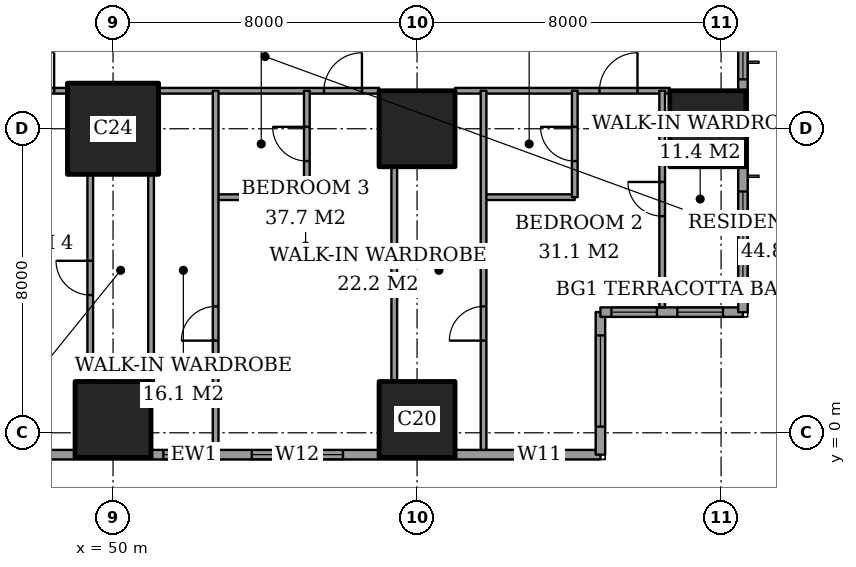
"""IFC4 building model, lengths in metres.
Left out: names, types, materials, properties, quantities, classifications, styles, units other than length and angle.
Written with IfcOpenShell. Run it as: python <this file> out.ifc"""

import sys

from ifc_helpers import new_model, si_unit, direction, frame, frame_2d, origin, origin_2d, place, context, subcontext, project, spatial, rectangle, extrude, element, fill, save


model = new_model("IFC4")
c1 = context("Model", 3, precision=1e-05, world=origin(), true_north=direction((0.0, 1.0)))
c2 = subcontext(c1, "Body", "Model", "MODEL_VIEW")
j1 = project(units=[si_unit("LENGTHUNIT", "METRE"), si_unit("PLANEANGLEUNIT", "RADIAN")], contexts=[c1])
p1 = place(None, origin())
s1 = spatial("IfcSite", under=j1, at=p1, CompositionType="ELEMENT")
p2 = place(p1, origin())
s2 = spatial("IfcBuilding", under=s1, at=p2, CompositionType="ELEMENT")
p3 = place(p2, frame((0.0, 0.0, 125.0)))
s3 = spatial("IfcBuildingStorey", under=s2, at=p3, CompositionType="ELEMENT", Elevation=125.0)
p4 = place(p3, frame((50.0, 0.35, 0.0), z_axis=(0.0, 0.0, 1.0), x_axis=(1.0, 0.0, 0.0)))
e1 = element("IfcColumn", 1, at=p4, inside=s3, PredefinedType="COLUMN", context=c2, shape_type="SweptSolid", body=[
    extrude(rectangle(XDim=2.0, YDim=2.0, at=origin_2d()), origin(), (0.0, 0.0, 1.0), 3.6),
])
p5 = place(p3, frame((50.0, 8.0, 0.0), z_axis=(0.0, 0.0, 1.0), x_axis=(1.0, 0.0, 0.0)))
e2 = element("IfcColumn", 2, at=p5, inside=s3, PredefinedType="COLUMN", context=c2, shape_type="SweptSolid", body=[
    extrude(rectangle(XDim=2.4, YDim=2.4, at=origin_2d()), origin(), (0.0, 0.0, 1.0), 3.6),
])
for number, where, z_axis, x_axis in (
    (3, (58.0, 0.35, 0.0), (0.0, 0.0, 1.0), (1.0, 0.0, 0.0)),
    (4, (58.0, 8.0, 0.0), (0.0, 0.0, 1.0), (1.0, 0.0, 0.0)),
    (5, (65.65, 8.0, 0.0), (0.0, 0.0, 1.0), (1.0, 0.0, 0.0)),
):
    element("IfcColumn", number, at=place(p3, frame(where, z_axis=z_axis, x_axis=x_axis)), inside=s3, PredefinedType="COLUMN", context=c2, shape_type="SweptSolid", body=[
        extrude(rectangle(XDim=2.0, YDim=2.0, at=origin_2d()), origin(), (0.0, 0.0, 1.0), 3.6),
    ])
p6 = place(p3, frame((41.425, -0.575, 0.0), z_axis=(0.0, 0.0, 1.0), x_axis=(1.0, 0.0, 0.0)))
e6 = element("IfcWall", 6, at=p6, inside=s3, PredefinedType="SOLIDWALL", context=c2, shape_type="SweptSolid", body=[
    extrude(rectangle(XDim=21.4, YDim=0.25, at=frame_2d((10.7, 0.0))), origin(), (0.0, 0.0, 1.0), 3.6),
])
p7 = place(p6, frame((2.3, 0.0, 0.4)))
e7 = element("IfcOpeningElement", 7, at=p7, cuts=e6, PredefinedType="OPENING", context=c2, shape_type="SweptSolid", body=[
    extrude(rectangle(XDim=1.2, YDim=2.2, at=frame_2d((0.6, 1.1))), frame((0.0, 0.135, 0.0), z_axis=(0.0, -1.0, 0.0), x_axis=(1.0, 0.0, 0.0)), (0.0, 0.0, 1.0), 0.27),
])
p8 = place(p6, frame((4.525, 0.0, 0.4)))
e8 = element("IfcOpeningElement", 8, at=p8, cuts=e6, PredefinedType="OPENING", context=c2, shape_type="SweptSolid", body=[
    extrude(rectangle(XDim=2.4, YDim=2.2, at=frame_2d((1.2, 1.1))), frame((0.0, 0.135, 0.0), z_axis=(0.0, -1.0, 0.0), x_axis=(1.0, 0.0, 0.0)), (0.0, 0.0, 1.0), 0.27),
])
p9 = place(p6, frame((9.9, 0.0, 0.4)))
e9 = element("IfcOpeningElement", 9, at=p9, cuts=e6, PredefinedType="OPENING", context=c2, shape_type="SweptSolid", body=[
    extrude(rectangle(XDim=1.2, YDim=2.2, at=frame_2d((0.6, 1.1))), frame((0.0, 0.135, 0.0), z_axis=(0.0, -1.0, 0.0), x_axis=(1.0, 0.0, 0.0)), (0.0, 0.0, 1.0), 0.27),
])
p10 = place(p6, frame((12.225, 0.0, 0.4)))
e10 = element("IfcOpeningElement", 10, at=p10, cuts=e6, PredefinedType="OPENING", context=c2, shape_type="SweptSolid", body=[
    extrude(rectangle(XDim=2.4, YDim=2.2, at=frame_2d((1.2, 1.1))), frame((0.0, 0.135, 0.0), z_axis=(0.0, -1.0, 0.0), x_axis=(1.0, 0.0, 0.0)), (0.0, 0.0, 1.0), 0.27),
])
p11 = place(p6, frame((19.2, 0.0, 0.4)))
e11 = element("IfcOpeningElement", 11, at=p11, cuts=e6, PredefinedType="OPENING", context=c2, shape_type="SweptSolid", body=[
    extrude(rectangle(XDim=1.2, YDim=2.2, at=frame_2d((0.6, 1.1))), frame((0.0, 0.135, 0.0), z_axis=(0.0, -1.0, 0.0), x_axis=(1.0, 0.0, 0.0)), (0.0, 0.0, 1.0), 0.27),
])
p12 = place(p3, frame((62.825, -0.575, 0.0), z_axis=(0.0, 0.0, 1.0), x_axis=(0.0, 1.0, 0.0)))
e12 = element("IfcWall", 12, at=p12, inside=s3, PredefinedType="SOLIDWALL", context=c2, shape_type="SweptSolid", body=[
    extrude(rectangle(XDim=3.75, YDim=0.25, at=frame_2d((1.875, 0.0))), origin(), (0.0, 0.0, 1.0), 3.6),
])
p13 = place(p12, frame((0.738, 0.0, 0.4)))
e13 = element("IfcOpeningElement", 13, at=p13, cuts=e12, PredefinedType="OPENING", context=c2, shape_type="SweptSolid", body=[
    extrude(rectangle(XDim=2.4, YDim=2.2, at=frame_2d((1.2, 1.1))), frame((0.0, 0.135, 0.0), z_axis=(0.0, -1.0, 0.0), x_axis=(1.0, 0.0, 0.0)), (0.0, 0.0, 1.0), 0.27),
])
p14 = place(p3, frame((62.825, 3.175, 0.0), z_axis=(0.0, 0.0, 1.0), x_axis=(1.0, 0.0, 0.0)))
e14 = element("IfcWall", 14, at=p14, inside=s3, PredefinedType="SOLIDWALL", context=c2, shape_type="SweptSolid", body=[
    extrude(rectangle(XDim=3.75, YDim=0.25, at=frame_2d((1.875, 0.0))), origin(), (0.0, 0.0, 1.0), 3.6),
])
p15 = place(p14, frame((0.288, 0.0, 0.4)))
e15 = element("IfcOpeningElement", 15, at=p15, cuts=e14, PredefinedType="OPENING", context=c2, shape_type="SweptSolid", body=[
    extrude(rectangle(XDim=1.2, YDim=2.2, at=frame_2d((0.6, 1.1))), frame((0.0, 0.135, 0.0), z_axis=(0.0, -1.0, 0.0), x_axis=(1.0, 0.0, 0.0)), (0.0, 0.0, 1.0), 0.27),
])
p16 = place(p14, frame((2.025, 0.0, 0.4)))
e16 = element("IfcOpeningElement", 16, at=p16, cuts=e14, PredefinedType="OPENING", context=c2, shape_type="SweptSolid", body=[
    extrude(rectangle(XDim=1.2, YDim=2.2, at=frame_2d((0.6, 1.1))), frame((0.0, 0.135, 0.0), z_axis=(0.0, -1.0, 0.0), x_axis=(1.0, 0.0, 0.0)), (0.0, 0.0, 1.0), 0.27),
])
p17 = place(p3, frame((66.575, 3.175, 0.0), z_axis=(0.0, 0.0, 1.0), x_axis=(0.0, 1.0, 0.0)))
e17 = element("IfcWall", 17, at=p17, inside=s3, PredefinedType="SOLIDWALL", context=c2, shape_type="SweptSolid", body=[
    extrude(rectangle(XDim=41.65, YDim=0.25, at=frame_2d((20.825, 0.0))), origin(), (0.0, 0.0, 1.0), 3.6),
])
p18 = place(p17, frame((0.775, 0.0, 0.4)))
e18 = element("IfcOpeningElement", 18, at=p18, cuts=e17, PredefinedType="OPENING", context=c2, shape_type="SweptSolid", body=[
    extrude(rectangle(XDim=2.4, YDim=2.2, at=frame_2d((1.2, 1.1))), frame((0.0, 0.135, 0.0), z_axis=(0.0, -1.0, 0.0), x_axis=(1.0, 0.0, 0.0)), (0.0, 0.0, 1.0), 0.27),
])
p19 = place(p17, frame((6.125, 0.0, 0.4)))
e19 = element("IfcOpeningElement", 19, at=p19, cuts=e17, PredefinedType="OPENING", context=c2, shape_type="SweptSolid", body=[
    extrude(rectangle(XDim=1.2, YDim=2.2, at=frame_2d((0.6, 1.1))), frame((0.0, 0.135, 0.0), z_axis=(0.0, -1.0, 0.0), x_axis=(1.0, 0.0, 0.0)), (0.0, 0.0, 1.0), 0.27),
])
p20 = place(p17, frame((8.375, 0.0, 0.4)))
e20 = element("IfcOpeningElement", 20, at=p20, cuts=e17, PredefinedType="OPENING", context=c2, shape_type="SweptSolid", body=[
    extrude(rectangle(XDim=2.4, YDim=2.2, at=frame_2d((1.2, 1.1))), frame((0.0, 0.135, 0.0), z_axis=(0.0, -1.0, 0.0), x_axis=(1.0, 0.0, 0.0)), (0.0, 0.0, 1.0), 0.27),
])
p21 = place(p17, frame((15.775, 0.0, 0.4)))
e21 = element("IfcOpeningElement", 21, at=p21, cuts=e17, PredefinedType="OPENING", context=c2, shape_type="SweptSolid", body=[
    extrude(rectangle(XDim=2.4, YDim=2.2, at=frame_2d((1.2, 1.1))), frame((0.0, 0.135, 0.0), z_axis=(0.0, -1.0, 0.0), x_axis=(1.0, 0.0, 0.0)), (0.0, 0.0, 1.0), 0.27),
])
p22 = place(p17, frame((23.475, 0.0, 0.4)))
e22 = element("IfcOpeningElement", 22, at=p22, cuts=e17, PredefinedType="OPENING", context=c2, shape_type="SweptSolid", body=[
    extrude(rectangle(XDim=2.4, YDim=2.2, at=frame_2d((1.2, 1.1))), frame((0.0, 0.135, 0.0), z_axis=(0.0, -1.0, 0.0), x_axis=(1.0, 0.0, 0.0)), (0.0, 0.0, 1.0), 0.27),
])
p23 = place(p17, frame((30.975, 0.0, 0.4)))
e23 = element("IfcOpeningElement", 23, at=p23, cuts=e17, PredefinedType="OPENING", context=c2, shape_type="SweptSolid", body=[
    extrude(rectangle(XDim=2.4, YDim=2.2, at=frame_2d((1.2, 1.1))), frame((0.0, 0.135, 0.0), z_axis=(0.0, -1.0, 0.0), x_axis=(1.0, 0.0, 0.0)), (0.0, 0.0, 1.0), 0.27),
])
p24 = place(p17, frame((34.5, 0.0, 0.4)))
e24 = element("IfcOpeningElement", 24, at=p24, cuts=e17, PredefinedType="OPENING", context=c2, shape_type="SweptSolid", body=[
    extrude(rectangle(XDim=1.2, YDim=2.2, at=frame_2d((0.6, 1.1))), frame((0.0, 0.135, 0.0), z_axis=(0.0, -1.0, 0.0), x_axis=(1.0, 0.0, 0.0)), (0.0, 0.0, 1.0), 0.27),
])
p25 = place(p17, frame((38.475, 0.0, 0.4)))
e25 = element("IfcOpeningElement", 25, at=p25, cuts=e17, PredefinedType="OPENING", context=c2, shape_type="SweptSolid", body=[
    extrude(rectangle(XDim=2.4, YDim=2.2, at=frame_2d((1.2, 1.1))), frame((0.0, 0.135, 0.0), z_axis=(0.0, -1.0, 0.0), x_axis=(1.0, 0.0, 0.0)), (0.0, 0.0, 1.0), 0.27),
])
p26 = place(p3, frame((52.7, 6.2, 0.0), z_axis=(0.0, 0.0, 1.0), x_axis=(1.0, 0.0, 0.0)))
e26 = element("IfcWall", 26, at=p26, inside=s3, PredefinedType="PARTITIONING", context=c2, shape_type="SweptSolid", body=[
    extrude(rectangle(XDim=2.4, YDim=0.15, at=frame_2d((1.2, 0.0))), origin(), (0.0, 0.0, 1.0), 3.35),
])
p27 = place(p3, frame((59.75, 6.2, 0.0), z_axis=(0.0, 0.0, 1.0), x_axis=(1.0, 0.0, 0.0)))
e27 = element("IfcWall", 27, at=p27, inside=s3, PredefinedType="PARTITIONING", context=c2, shape_type="SweptSolid", body=[
    extrude(rectangle(XDim=2.4, YDim=0.15, at=frame_2d((1.2, 0.0))), origin(), (0.0, 0.0, 1.0), 3.35),
])
p28 = place(p3, frame((43.35, 9.0, 0.0), z_axis=(0.0, 0.0, 1.0), x_axis=(1.0, 0.0, 0.0)))
e28 = element("IfcWall", 28, at=p28, inside=s3, PredefinedType="PARTITIONING", context=c2, shape_type="SweptSolid", body=[
    extrude(rectangle(XDim=5.45, YDim=0.15, at=frame_2d((2.725, 0.0))), origin(), (0.0, 0.0, 1.0), 3.35),
])
p29 = place(p28, frame((4.1, 0.0, 0.0)))
e29 = element("IfcOpeningElement", 29, at=p29, cuts=e28, PredefinedType="OPENING", context=c2, shape_type="SweptSolid", body=[
    extrude(rectangle(XDim=1.0, YDim=2.1, at=frame_2d((0.5, 1.05))), frame((0.0, 0.085, 0.0), z_axis=(0.0, -1.0, 0.0), x_axis=(1.0, 0.0, 0.0)), (0.0, 0.0, 1.0), 0.17),
])
p30 = place(p28, frame((0.475, 0.0, 0.0)))
e30 = element("IfcOpeningElement", 30, at=p30, cuts=e28, PredefinedType="OPENING", context=c2, shape_type="SweptSolid", body=[
    extrude(rectangle(XDim=1.0, YDim=2.1, at=frame_2d((0.5, 1.05))), frame((0.0, 0.085, 0.0), z_axis=(0.0, -1.0, 0.0), x_axis=(1.0, 0.0, 0.0)), (0.0, 0.0, 1.0), 0.17),
])
p31 = place(p3, frame((51.2, 9.0, 0.0), z_axis=(0.0, 0.0, 1.0), x_axis=(1.0, 0.0, 0.0)))
e31 = element("IfcWall", 31, at=p31, inside=s3, PredefinedType="PARTITIONING", context=c2, shape_type="SweptSolid", body=[
    extrude(rectangle(XDim=5.8, YDim=0.15, at=frame_2d((2.9, 0.0))), origin(), (0.0, 0.0, 1.0), 3.35),
])
p32 = place(p31, frame((4.35, 0.0, 0.0)))
e32 = element("IfcOpeningElement", 32, at=p32, cuts=e31, PredefinedType="OPENING", context=c2, shape_type="SweptSolid", body=[
    extrude(rectangle(XDim=1.0, YDim=2.1, at=frame_2d((0.5, 1.05))), frame((0.0, 0.085, 0.0), z_axis=(0.0, -1.0, 0.0), x_axis=(1.0, 0.0, 0.0)), (0.0, 0.0, 1.0), 0.17),
])
p33 = place(p3, frame((59.0, 9.0, 0.0), z_axis=(0.0, 0.0, 1.0), x_axis=(1.0, 0.0, 0.0)))
e33 = element("IfcWall", 33, at=p33, inside=s3, PredefinedType="PARTITIONING", context=c2, shape_type="SweptSolid", body=[
    extrude(rectangle(XDim=5.65, YDim=0.15, at=frame_2d((2.825, 0.0))), origin(), (0.0, 0.0, 1.0), 3.35),
])
p34 = place(p33, frame((3.8, 0.0, 0.0)))
e34 = element("IfcOpeningElement", 34, at=p34, cuts=e33, PredefinedType="OPENING", context=c2, shape_type="SweptSolid", body=[
    extrude(rectangle(XDim=1.0, YDim=2.1, at=frame_2d((0.5, 1.05))), frame((0.0, 0.085, 0.0), z_axis=(0.0, -1.0, 0.0), x_axis=(1.0, 0.0, 0.0)), (0.0, 0.0, 1.0), 0.17),
])
p35 = place(p3, frame((49.4, 1.35, 0.0), z_axis=(0.0, 0.0, 1.0), x_axis=(0.0, 1.0, 0.0)))
e35 = element("IfcWall", 35, at=p35, inside=s3, PredefinedType="PARTITIONING", context=c2, shape_type="SweptSolid", body=[
    extrude(rectangle(XDim=5.45, YDim=0.15, at=frame_2d((2.725, 0.0))), origin(), (0.0, 0.0, 1.0), 3.35),
])
p36 = place(p35, frame((2.275, 0.0, 0.0)))
e36 = element("IfcOpeningElement", 36, at=p36, cuts=e35, PredefinedType="OPENING", context=c2, shape_type="SweptSolid", body=[
    extrude(rectangle(XDim=0.9, YDim=2.1, at=frame_2d((0.45, 1.05))), frame((0.0, 0.085, 0.0), z_axis=(0.0, -1.0, 0.0), x_axis=(1.0, 0.0, 0.0)), (0.0, 0.0, 1.0), 0.17),
])
p37 = place(p3, frame((51.0, 1.35, 0.0), z_axis=(0.0, 0.0, 1.0), x_axis=(0.0, 1.0, 0.0)))
e37 = element("IfcWall", 37, at=p37, inside=s3, PredefinedType="PARTITIONING", context=c2, shape_type="SweptSolid", body=[
    extrude(rectangle(XDim=5.45, YDim=0.15, at=frame_2d((2.725, 0.0))), origin(), (0.0, 0.0, 1.0), 3.35),
])
p38 = place(p3, frame((52.7, -0.45, 0.0), z_axis=(0.0, 0.0, 1.0), x_axis=(0.0, 1.0, 0.0)))
e38 = element("IfcWall", 38, at=p38, inside=s3, PredefinedType="PARTITIONING", context=c2, shape_type="SweptSolid", body=[
    extrude(rectangle(XDim=9.45, YDim=0.15, at=frame_2d((4.725, 0.0))), origin(), (0.0, 0.0, 1.0), 3.35),
])
p39 = place(p38, frame((2.875, 0.0, 0.0)))
e39 = element("IfcOpeningElement", 39, at=p39, cuts=e38, PredefinedType="OPENING", context=c2, shape_type="SweptSolid", body=[
    extrude(rectangle(XDim=0.9, YDim=2.1, at=frame_2d((0.45, 1.05))), frame((0.0, 0.085, 0.0), z_axis=(0.0, -1.0, 0.0), x_axis=(1.0, 0.0, 0.0)), (0.0, 0.0, 1.0), 0.17),
])
p40 = place(p3, frame((55.1, 6.2, 0.0), z_axis=(0.0, 0.0, 1.0), x_axis=(0.0, 1.0, 0.0)))
e40 = element("IfcWall", 40, at=p40, inside=s3, PredefinedType="PARTITIONING", context=c2, shape_type="SweptSolid", body=[
    extrude(rectangle(XDim=2.8, YDim=0.15, at=frame_2d((1.4, 0.0))), origin(), (0.0, 0.0, 1.0), 3.35),
])
p41 = place(p40, frame((0.95, 0.0, 0.0)))
e41 = element("IfcOpeningElement", 41, at=p41, cuts=e40, PredefinedType="OPENING", context=c2, shape_type="SweptSolid", body=[
    extrude(rectangle(XDim=0.9, YDim=2.1, at=frame_2d((0.45, 1.05))), frame((0.0, 0.085, 0.0), z_axis=(0.0, -1.0, 0.0), x_axis=(1.0, 0.0, 0.0)), (0.0, 0.0, 1.0), 0.17),
])
p42 = place(p3, frame((57.4, 1.35, 0.0), z_axis=(0.0, 0.0, 1.0), x_axis=(0.0, 1.0, 0.0)))
e42 = element("IfcWall", 42, at=p42, inside=s3, PredefinedType="PARTITIONING", context=c2, shape_type="SweptSolid", body=[
    extrude(rectangle(XDim=5.65, YDim=0.15, at=frame_2d((2.825, 0.0))), origin(), (0.0, 0.0, 1.0), 3.35),
])
p43 = place(p3, frame((59.75, -0.45, 0.0), z_axis=(0.0, 0.0, 1.0), x_axis=(0.0, 1.0, 0.0)))
e43 = element("IfcWall", 43, at=p43, inside=s3, PredefinedType="PARTITIONING", context=c2, shape_type="SweptSolid", body=[
    extrude(rectangle(XDim=9.45, YDim=0.15, at=frame_2d((4.725, 0.0))), origin(), (0.0, 0.0, 1.0), 3.35),
])
p44 = place(p43, frame((2.875, 0.0, 0.0)))
e44 = element("IfcOpeningElement", 44, at=p44, cuts=e43, PredefinedType="OPENING", context=c2, shape_type="SweptSolid", body=[
    extrude(rectangle(XDim=0.9, YDim=2.1, at=frame_2d((0.45, 1.05))), frame((0.0, 0.085, 0.0), z_axis=(0.0, -1.0, 0.0), x_axis=(1.0, 0.0, 0.0)), (0.0, 0.0, 1.0), 0.17),
])
p45 = place(p3, frame((62.15, 6.2, 0.0), z_axis=(0.0, 0.0, 1.0), x_axis=(0.0, 1.0, 0.0)))
e45 = element("IfcWall", 45, at=p45, inside=s3, PredefinedType="PARTITIONING", context=c2, shape_type="SweptSolid", body=[
    extrude(rectangle(XDim=2.8, YDim=0.15, at=frame_2d((1.4, 0.0))), origin(), (0.0, 0.0, 1.0), 3.35),
])
p46 = place(p45, frame((0.95, 0.0, 0.0)))
e46 = element("IfcOpeningElement", 46, at=p46, cuts=e45, PredefinedType="OPENING", context=c2, shape_type="SweptSolid", body=[
    extrude(rectangle(XDim=0.9, YDim=2.1, at=frame_2d((0.45, 1.05))), frame((0.0, 0.085, 0.0), z_axis=(0.0, -1.0, 0.0), x_axis=(1.0, 0.0, 0.0)), (0.0, 0.0, 1.0), 0.17),
])
p47 = place(p3, frame((64.45, 3.3, 0.0), z_axis=(0.0, 0.0, 1.0), x_axis=(0.0, 1.0, 0.0)))
e47 = element("IfcWall", 47, at=p47, inside=s3, PredefinedType="PARTITIONING", context=c2, shape_type="SweptSolid", body=[
    extrude(rectangle(XDim=5.7, YDim=0.15, at=frame_2d((2.85, 0.0))), origin(), (0.0, 0.0, 1.0), 3.35),
])
p48 = place(p47, frame((2.4, 0.0, 0.0)))
e48 = element("IfcOpeningElement", 48, at=p48, cuts=e47, PredefinedType="OPENING", context=c2, shape_type="SweptSolid", body=[
    extrude(rectangle(XDim=0.9, YDim=2.1, at=frame_2d((0.45, 1.05))), frame((0.0, 0.085, 0.0), z_axis=(0.0, -1.0, 0.0), x_axis=(1.0, 0.0, 0.0)), (0.0, 0.0, 1.0), 0.17),
])
p49 = place(p9, origin())
e49 = element("IfcWindow", 49, at=p49, inside=s3, PartitioningType="SINGLE_PANEL", PredefinedType="WINDOW", context=c2, shape_type="SweptSolid", body=[
    extrude(rectangle(XDim=1.2, YDim=2.2, at=frame_2d((0.6, 1.1))), frame((0.0, 0.03, 0.0), z_axis=(0.0, -1.0, 0.0), x_axis=(1.0, 0.0, 0.0)), (0.0, 0.0, 1.0), 0.06),
])
fill(e9, e49)
p50 = place(p10, origin())
e50 = element("IfcWindow", 50, at=p50, inside=s3, PartitioningType="SINGLE_PANEL", PredefinedType="WINDOW", context=c2, shape_type="SweptSolid", body=[
    extrude(rectangle(XDim=2.4, YDim=2.2, at=frame_2d((1.2, 1.1))), frame((0.0, 0.03, 0.0), z_axis=(0.0, -1.0, 0.0), x_axis=(1.0, 0.0, 0.0)), (0.0, 0.0, 1.0), 0.06),
])
fill(e10, e50)
p51 = place(p11, origin())
e51 = element("IfcWindow", 51, at=p51, inside=s3, PartitioningType="SINGLE_PANEL", PredefinedType="WINDOW", context=c2, shape_type="SweptSolid", body=[
    extrude(rectangle(XDim=1.2, YDim=2.2, at=frame_2d((0.6, 1.1))), frame((0.0, 0.03, 0.0), z_axis=(0.0, -1.0, 0.0), x_axis=(1.0, 0.0, 0.0)), (0.0, 0.0, 1.0), 0.06),
])
fill(e11, e51)
p52 = place(p13, origin())
e52 = element("IfcWindow", 52, at=p52, inside=s3, PartitioningType="SINGLE_PANEL", PredefinedType="WINDOW", context=c2, shape_type="SweptSolid", body=[
    extrude(rectangle(XDim=2.4, YDim=2.2, at=frame_2d((1.2, 1.1))), frame((0.0, 0.03, 0.0), z_axis=(0.0, -1.0, 0.0), x_axis=(1.0, 0.0, 0.0)), (0.0, 0.0, 1.0), 0.06),
])
fill(e13, e52)
p53 = place(p15, origin())
e53 = element("IfcWindow", 53, at=p53, inside=s3, PartitioningType="SINGLE_PANEL", PredefinedType="WINDOW", context=c2, shape_type="SweptSolid", body=[
    extrude(rectangle(XDim=1.2, YDim=2.2, at=frame_2d((0.6, 1.1))), frame((0.0, 0.03, 0.0), z_axis=(0.0, -1.0, 0.0), x_axis=(1.0, 0.0, 0.0)), (0.0, 0.0, 1.0), 0.06),
])
fill(e15, e53)
p54 = place(p16, origin())
e54 = element("IfcWindow", 54, at=p54, inside=s3, PartitioningType="SINGLE_PANEL", PredefinedType="WINDOW", context=c2, shape_type="SweptSolid", body=[
    extrude(rectangle(XDim=1.2, YDim=2.2, at=frame_2d((0.6, 1.1))), frame((0.0, 0.03, 0.0), z_axis=(0.0, -1.0, 0.0), x_axis=(1.0, 0.0, 0.0)), (0.0, 0.0, 1.0), 0.06),
])
fill(e16, e54)
p55 = place(p18, origin())
e55 = element("IfcWindow", 55, at=p55, inside=s3, PartitioningType="SINGLE_PANEL", PredefinedType="WINDOW", context=c2, shape_type="SweptSolid", body=[
    extrude(rectangle(XDim=2.4, YDim=2.2, at=frame_2d((1.2, 1.1))), frame((0.0, 0.03, 0.0), z_axis=(0.0, -1.0, 0.0), x_axis=(1.0, 0.0, 0.0)), (0.0, 0.0, 1.0), 0.06),
])
fill(e18, e55)
p56 = place(p19, origin())
e56 = element("IfcWindow", 56, at=p56, inside=s3, PartitioningType="SINGLE_PANEL", PredefinedType="WINDOW", context=c2, shape_type="SweptSolid", body=[
    extrude(rectangle(XDim=1.2, YDim=2.2, at=frame_2d((0.6, 1.1))), frame((0.0, 0.03, 0.0), z_axis=(0.0, -1.0, 0.0), x_axis=(1.0, 0.0, 0.0)), (0.0, 0.0, 1.0), 0.06),
])
fill(e19, e56)
p57 = place(p48, origin())
e57 = element("IfcDoor", 57, at=p57, inside=s3, OperationType="SINGLE_SWING_LEFT", PredefinedType="DOOR", context=c2, shape_type="SweptSolid", body=[
    extrude(rectangle(XDim=0.9, YDim=2.1, at=frame_2d((0.45, 1.05))), frame((0.0, 0.025, 0.0), z_axis=(0.0, -1.0, 0.0), x_axis=(1.0, 0.0, 0.0)), (0.0, 0.0, 1.0), 0.05),
])
fill(e48, e57)
p58 = place(p46, origin())
e58 = element("IfcDoor", 58, at=p58, inside=s3, OperationType="SINGLE_SWING_LEFT", PredefinedType="DOOR", context=c2, shape_type="SweptSolid", body=[
    extrude(rectangle(XDim=0.9, YDim=2.1, at=frame_2d((0.45, 1.05))), frame((0.0, 0.025, 0.0), z_axis=(0.0, -1.0, 0.0), x_axis=(1.0, 0.0, 0.0)), (0.0, 0.0, 1.0), 0.05),
])
fill(e46, e58)
p59 = place(p34, origin())
e59 = element("IfcDoor", 59, at=p59, inside=s3, OperationType="SINGLE_SWING_LEFT", PredefinedType="DOOR", context=c2, shape_type="SweptSolid", body=[
    extrude(rectangle(XDim=1.0, YDim=2.1, at=frame_2d((0.5, 1.05))), frame((0.0, 0.025, 0.0), z_axis=(0.0, -1.0, 0.0), x_axis=(1.0, 0.0, 0.0)), (0.0, 0.0, 1.0), 0.05),
])
fill(e34, e59)
p60 = place(p44, origin())
e60 = element("IfcDoor", 60, at=p60, inside=s3, OperationType="SINGLE_SWING_RIGHT", PredefinedType="DOOR", context=c2, shape_type="SweptSolid", body=[
    extrude(rectangle(XDim=0.9, YDim=2.1, at=frame_2d((0.45, 1.05))), frame((0.0, 0.025, 0.0), z_axis=(0.0, -1.0, 0.0), x_axis=(1.0, 0.0, 0.0)), (0.0, 0.0, 1.0), 0.05),
])
fill(e44, e60)
p61 = place(p41, origin())
e61 = element("IfcDoor", 61, at=p61, inside=s3, OperationType="SINGLE_SWING_LEFT", PredefinedType="DOOR", context=c2, shape_type="SweptSolid", body=[
    extrude(rectangle(XDim=0.9, YDim=2.1, at=frame_2d((0.45, 1.05))), frame((0.0, 0.025, 0.0), z_axis=(0.0, -1.0, 0.0), x_axis=(1.0, 0.0, 0.0)), (0.0, 0.0, 1.0), 0.05),
])
fill(e41, e61)
p62 = place(p32, origin())
e62 = element("IfcDoor", 62, at=p62, inside=s3, OperationType="SINGLE_SWING_LEFT", PredefinedType="DOOR", context=c2, shape_type="SweptSolid", body=[
    extrude(rectangle(XDim=1.0, YDim=2.1, at=frame_2d((0.5, 1.05))), frame((0.0, 0.025, 0.0), z_axis=(0.0, -1.0, 0.0), x_axis=(1.0, 0.0, 0.0)), (0.0, 0.0, 1.0), 0.05),
])
fill(e32, e62)
p63 = place(p39, origin())
e63 = element("IfcDoor", 63, at=p63, inside=s3, OperationType="SINGLE_SWING_RIGHT", PredefinedType="DOOR", context=c2, shape_type="SweptSolid", body=[
    extrude(rectangle(XDim=0.9, YDim=2.1, at=frame_2d((0.45, 1.05))), frame((0.0, 0.025, 0.0), z_axis=(0.0, -1.0, 0.0), x_axis=(1.0, 0.0, 0.0)), (0.0, 0.0, 1.0), 0.05),
])
fill(e39, e63)
p64 = place(p36, origin())
e64 = element("IfcDoor", 64, at=p64, inside=s3, OperationType="SINGLE_SWING_LEFT", PredefinedType="DOOR", context=c2, shape_type="SweptSolid", body=[
    extrude(rectangle(XDim=0.9, YDim=2.1, at=frame_2d((0.45, 1.05))), frame((0.0, 0.025, 0.0), z_axis=(0.0, -1.0, 0.0), x_axis=(1.0, 0.0, 0.0)), (0.0, 0.0, 1.0), 0.05),
])
fill(e36, e64)
p65 = place(p29, origin())
e65 = element("IfcDoor", 65, at=p65, inside=s3, OperationType="SINGLE_SWING_LEFT", PredefinedType="DOOR", context=c2, shape_type="SweptSolid", body=[
    extrude(rectangle(XDim=1.0, YDim=2.1, at=frame_2d((0.5, 1.05))), frame((0.0, 0.025, 0.0), z_axis=(0.0, -1.0, 0.0), x_axis=(1.0, 0.0, 0.0)), (0.0, 0.0, 1.0), 0.05),
])
fill(e29, e65)
save(model, sys.argv[1])
